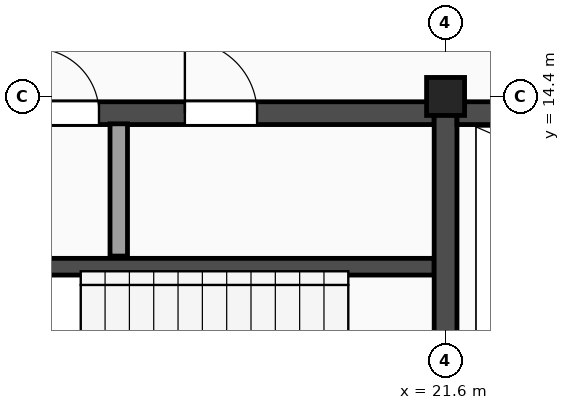
"""IFC4 building model, lengths in metres.
Left out: names, types, materials, properties, quantities, classifications, styles, units other than length and angle.
Written with IfcOpenShell. Run it as: python <this file> out.ifc"""

import sys

from ifc_helpers import new_model, si_unit, direction, frame, frame_2d, origin, origin_2d, place, context, subcontext, project, spatial, rectangle, extrude, element, fill, save


model = new_model("IFC4")
c1 = context("Model", 3, precision=1e-05, world=origin(), true_north=direction((0.0, 1.0)))
c2 = subcontext(c1, "Body", "Model", "MODEL_VIEW")
j1 = project(units=[si_unit("LENGTHUNIT", "METRE"), si_unit("PLANEANGLEUNIT", "RADIAN")], contexts=[c1])
p1 = place(None, origin())
s1 = spatial("IfcSite", under=j1, at=p1, CompositionType="ELEMENT")
p2 = place(p1, origin())
s2 = spatial("IfcBuilding", under=s1, at=p2, CompositionType="ELEMENT")
p3 = place(p2, frame((0.0, 0.0, 22.8)))
s3 = spatial("IfcBuildingStorey", under=s2, at=p3, CompositionType="ELEMENT", Elevation=22.8)
p4 = place(p3, frame((21.6, 14.4, 0.0), z_axis=(0.0, 0.0, 1.0), x_axis=(1.0, 0.0, 0.0)))
e1 = element("IfcColumn", 1, at=p4, inside=s3, PredefinedType="COLUMN", context=c2, shape_type="SweptSolid", body=[
    extrude(rectangle(XDim=0.5, YDim=0.5, at=origin_2d()), origin(), (0.0, 0.0, 1.0), 3.9),
])
p5 = place(p3, frame((14.77, 14.18, 0.0), z_axis=(0.0, 0.0, 1.0), x_axis=(1.0, 0.0, 0.0)))
e2 = element("IfcWall", 2, at=p5, inside=s3, PredefinedType="SHEAR", context=c2, shape_type="SweptSolid", body=[
    extrude(rectangle(XDim=6.68, YDim=0.3, at=frame_2d((3.34, 0.0))), origin(), (0.0, 0.0, 1.0), 3.67),
])
p6 = place(p5, frame((1.42, 0.0, 0.0)))
e3 = element("IfcOpeningElement", 3, at=p6, cuts=e2, PredefinedType="OPENING", context=c2, shape_type="SweptSolid", body=[
    extrude(rectangle(XDim=0.85, YDim=2.1, at=frame_2d((0.425, 1.05))), frame((0.0, 0.16, 0.0), z_axis=(0.0, -1.0, 0.0), x_axis=(1.0, 0.0, 0.0)), (0.0, 0.0, 1.0), 0.32),
])
p7 = place(p5, frame((3.4, 0.0, 0.0)))
e4 = element("IfcOpeningElement", 4, at=p7, cuts=e2, PredefinedType="OPENING", context=c2, shape_type="SweptSolid", body=[
    extrude(rectangle(XDim=0.95, YDim=2.15, at=frame_2d((0.475, 1.075))), frame((0.0, 0.16, 0.0), z_axis=(0.0, -1.0, 0.0), x_axis=(1.0, 0.0, 0.0)), (0.0, 0.0, 1.0), 0.32),
])
p8 = place(p3, frame((14.77, 12.16, 0.0), z_axis=(0.0, 0.0, 1.0), x_axis=(1.0, 0.0, 0.0)))
e5 = element("IfcWall", 5, at=p8, inside=s3, PredefinedType="SHEAR", context=c2, shape_type="SweptSolid", body=[
    extrude(rectangle(XDim=6.68, YDim=0.22, at=frame_2d((3.34, 0.0))), origin(), (0.0, 0.0, 1.0), 3.67),
])
p9 = place(p3, frame((17.3, 12.3, 0.0), z_axis=(0.0, 0.0, 1.0), x_axis=(0.0, 1.0, 0.0)))
e6 = element("IfcWall", 6, at=p9, inside=s3, PredefinedType="PARTITIONING", context=c2, shape_type="SweptSolid", body=[
    extrude(rectangle(XDim=1.74, YDim=0.23, at=frame_2d((0.87, 0.0))), origin(), (0.0, 0.0, 1.0), 3.67),
])
p10 = place(p3, frame((21.6, 7.27, 0.0), z_axis=(0.0, 0.0, 1.0), x_axis=(0.0, 1.0, 0.0)))
e7 = element("IfcWall", 7, at=p10, inside=s3, PredefinedType="SHEAR", context=c2, shape_type="SweptSolid", body=[
    extrude(rectangle(XDim=7.06, YDim=0.3, at=frame_2d((3.53, 0.0))), origin(), (0.0, 0.0, 1.0), 3.67),
])
p11 = place(p10, frame((1.4, 0.0, 0.0)))
e8 = element("IfcOpeningElement", 8, at=p11, cuts=e7, PredefinedType="OPENING", context=c2, shape_type="SweptSolid", body=[
    extrude(rectangle(XDim=1.8, YDim=2.2, at=frame_2d((0.9, 1.1))), frame((0.0, 0.16, 0.0), z_axis=(0.0, -1.0, 0.0), x_axis=(1.0, 0.0, 0.0)), (0.0, 0.0, 1.0), 0.32),
])
p12 = place(p3, frame((21.75, 14.18, 0.0), z_axis=(0.0, 0.0, 1.0), x_axis=(1.0, 0.0, 0.0)))
e9 = element("IfcWall", 9, at=p12, inside=s3, PredefinedType="SHEAR", context=c2, shape_type="SweptSolid", body=[
    extrude(rectangle(XDim=6.68, YDim=0.3, at=frame_2d((3.34, 0.0))), origin(), (0.0, 0.0, 1.0), 3.67),
])
p13 = place(p6, origin())
e10 = element("IfcDoor", 10, at=p13, inside=s3, OperationType="SINGLE_SWING_LEFT", PredefinedType="DOOR", context=c2, shape_type="SweptSolid", body=[
    extrude(rectangle(XDim=0.85, YDim=2.1, at=frame_2d((0.425, 1.05))), frame((0.0, 0.025, 0.0), z_axis=(0.0, -1.0, 0.0), x_axis=(1.0, 0.0, 0.0)), (0.0, 0.0, 1.0), 0.05),
])
fill(e3, e10)
p14 = place(p7, origin())
e11 = element("IfcDoor", 11, at=p14, inside=s3, OperationType="SINGLE_SWING_LEFT", PredefinedType="DOOR", context=c2, shape_type="SweptSolid", body=[
    extrude(rectangle(XDim=0.95, YDim=2.15, at=frame_2d((0.475, 1.075))), frame((0.0, 0.025, 0.0), z_axis=(0.0, -1.0, 0.0), x_axis=(1.0, 0.0, 0.0)), (0.0, 0.0, 1.0), 0.05),
])
fill(e4, e11)
save(model, sys.argv[1])
